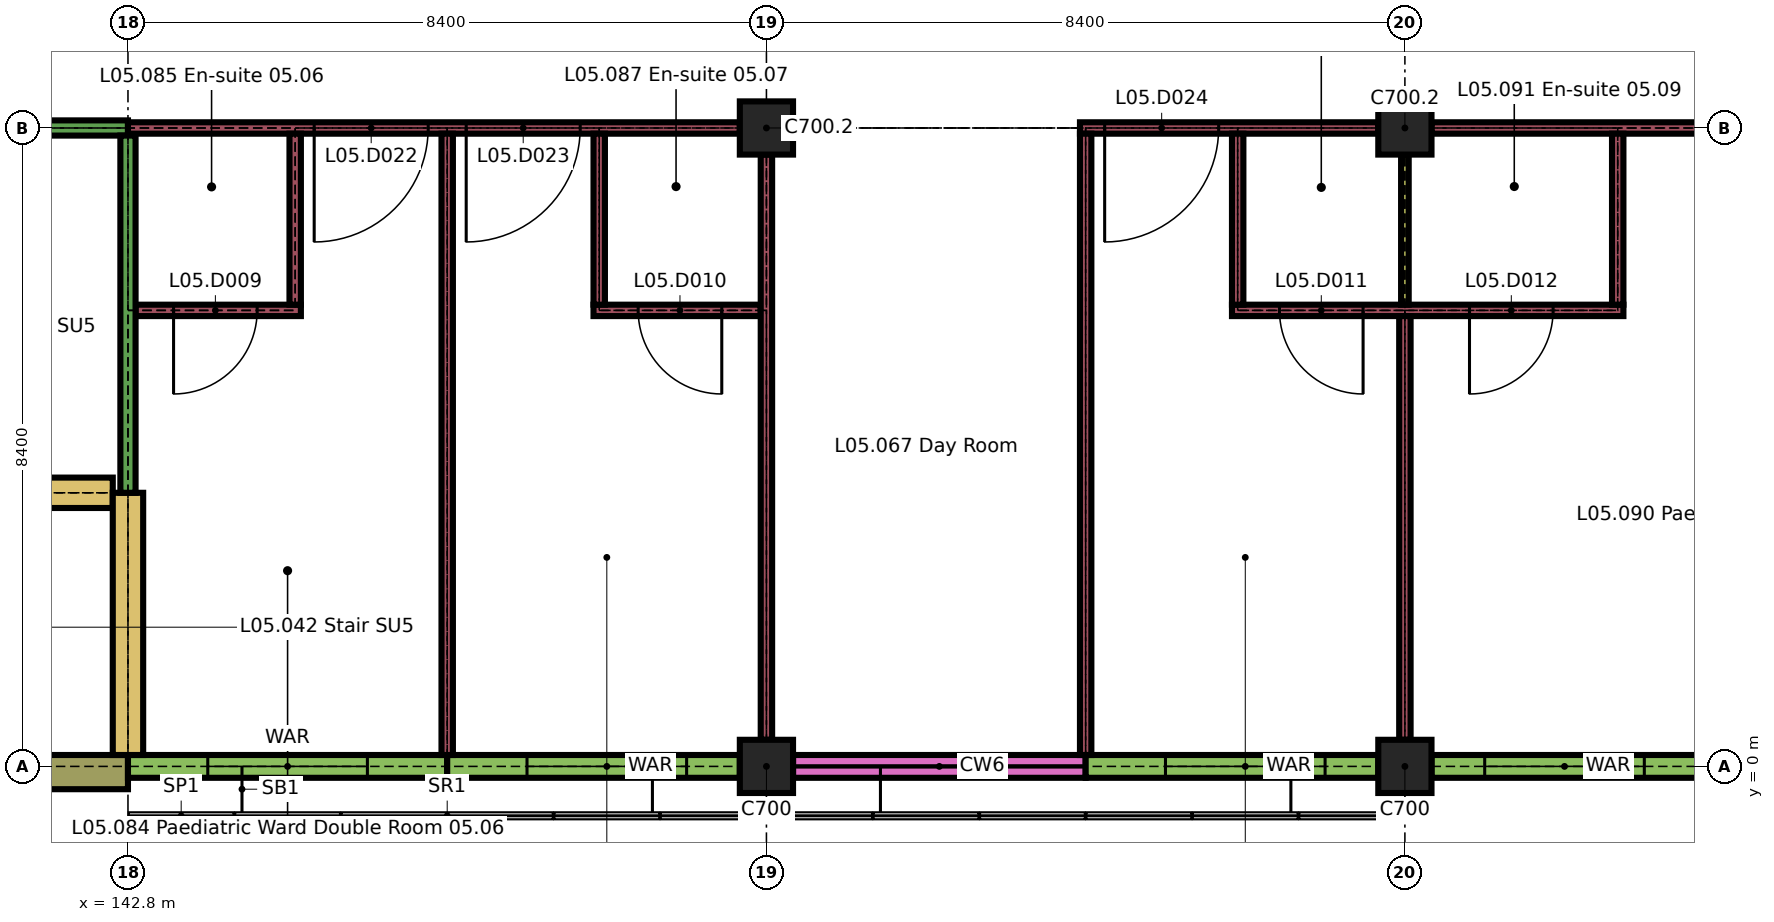
"""IFC4 building model, lengths in metres.
Left out: names, types, materials, properties, quantities, classifications, styles, units other than length and angle.
Written with IfcOpenShell. Run it as: python <this file> out.ifc"""

import sys

from ifc_helpers import new_model, si_unit, direction, frame, frame_2d, origin, origin_2d, place, context, subcontext, project, spatial, rectangle, extrude, element, fill, save


model = new_model("IFC4")
c1 = context("Model", 3, precision=1e-05, world=origin(), true_north=direction((0.0, 1.0)))
c2 = subcontext(c1, "Body", "Model", "MODEL_VIEW")
j1 = project(units=[si_unit("LENGTHUNIT", "METRE"), si_unit("PLANEANGLEUNIT", "RADIAN")], contexts=[c1])
p1 = place(None, origin())
s1 = spatial("IfcSite", under=j1, at=p1, CompositionType="ELEMENT")
p2 = place(p1, origin())
s2 = spatial("IfcBuilding", under=s1, at=p2, CompositionType="ELEMENT")
p3 = place(p2, frame((0.0, 0.0, 22.5)))
s3 = spatial("IfcBuildingStorey", under=s2, at=p3, CompositionType="ELEMENT", Elevation=22.5)
for number, where, z_axis, x_axis in (
    (1, (151.2, 0.0, 0.0), (0.0, 0.0, 1.0), (1.0, 0.0, 0.0)),
    (2, (159.6, 0.0, 0.0), (0.0, 0.0, 1.0), (1.0, 0.0, 0.0)),
    (3, (151.2, 8.4, 0.0), (0.0, 0.0, 1.0), (1.0, 0.0, 0.0)),
    (4, (159.6, 8.4, 0.0), (0.0, 0.0, 1.0), (1.0, 0.0, 0.0)),
):
    element("IfcColumn", number, at=place(p3, frame(where, z_axis=z_axis, x_axis=x_axis)), inside=s3, PredefinedType="COLUMN", context=c2, shape_type="SweptSolid", body=[
        extrude(rectangle(XDim=0.7, YDim=0.7, at=origin_2d()), origin(), (0.0, 0.0, 1.0), 3.26),
    ])
p4 = place(p3, frame((138.95, -0.075, 0.0), z_axis=(0.0, 0.0, 1.0), x_axis=(1.0, 0.0, 0.0)))
e5 = element("IfcWall", 5, at=p4, inside=s3, PredefinedType="SOLIDWALL", context=c2, shape_type="SweptSolid", body=[
    extrude(rectangle(XDim=3.85, YDim=0.45, at=frame_2d((1.925, 0.0))), origin(), (0.0, 0.0, 1.0), 3.26),
])
p5 = place(p3, frame((142.8, 0.0, 0.0), z_axis=(0.0, 0.0, 1.0), x_axis=(1.0, 0.0, 0.0)))
e6 = element("IfcWall", 6, at=p5, inside=s3, PredefinedType="SOLIDWALL", context=c2, shape_type="SweptSolid", body=[
    extrude(rectangle(XDim=4.2, YDim=0.3, at=frame_2d((2.1, 0.0))), origin(), (0.0, 0.0, 1.0), 2.96),
])
p6 = place(p5, frame((1.05, 0.0, 0.9)))
e7 = element("IfcOpeningElement", 7, at=p6, cuts=e6, PredefinedType="OPENING", context=c2, shape_type="SweptSolid", body=[
    extrude(rectangle(XDim=2.1, YDim=1.5, at=frame_2d((1.05, 0.75))), frame((0.0, 0.16, 0.0), z_axis=(0.0, -1.0, 0.0), x_axis=(1.0, 0.0, 0.0)), (0.0, 0.0, 1.0), 0.32),
])
p7 = place(p3, frame((147.0, 0.0, 0.0), z_axis=(0.0, 0.0, 1.0), x_axis=(1.0, 0.0, 0.0)))
e8 = element("IfcWall", 8, at=p7, inside=s3, PredefinedType="SOLIDWALL", context=c2, shape_type="SweptSolid", body=[
    extrude(rectangle(XDim=3.85, YDim=0.3, at=frame_2d((1.925, 0.0))), origin(), (0.0, 0.0, 1.0), 2.96),
])
p8 = place(p7, frame((1.05, 0.0, 0.9)))
e9 = element("IfcOpeningElement", 9, at=p8, cuts=e8, PredefinedType="OPENING", context=c2, shape_type="SweptSolid", body=[
    extrude(rectangle(XDim=2.1, YDim=1.5, at=frame_2d((1.05, 0.75))), frame((0.0, 0.16, 0.0), z_axis=(0.0, -1.0, 0.0), x_axis=(1.0, 0.0, 0.0)), (0.0, 0.0, 1.0), 0.32),
])
p9 = place(p3, frame((151.55, 0.0, 0.0), z_axis=(0.0, 0.0, 1.0), x_axis=(1.0, 0.0, 0.0)))
e10 = element("IfcWall", 10, at=p9, inside=s3, PredefinedType="SOLIDWALL", context=c2, shape_type="SweptSolid", body=[
    extrude(rectangle(XDim=3.85, YDim=0.3, at=frame_2d((1.925, 0.0))), origin(), (0.0, 0.0, 1.0), 0.6),
])
p10 = place(p3, frame((155.4, 0.0, 0.0), z_axis=(0.0, 0.0, 1.0), x_axis=(1.0, 0.0, 0.0)))
e11 = element("IfcWall", 11, at=p10, inside=s3, PredefinedType="SOLIDWALL", context=c2, shape_type="SweptSolid", body=[
    extrude(rectangle(XDim=3.85, YDim=0.3, at=frame_2d((1.925, 0.0))), origin(), (0.0, 0.0, 1.0), 2.96),
])
p11 = place(p10, frame((1.05, 0.0, 0.9)))
e12 = element("IfcOpeningElement", 12, at=p11, cuts=e11, PredefinedType="OPENING", context=c2, shape_type="SweptSolid", body=[
    extrude(rectangle(XDim=2.1, YDim=1.5, at=frame_2d((1.05, 0.75))), frame((0.0, 0.16, 0.0), z_axis=(0.0, -1.0, 0.0), x_axis=(1.0, 0.0, 0.0)), (0.0, 0.0, 1.0), 0.32),
])
p12 = place(p3, frame((159.95, 0.0, 0.0), z_axis=(0.0, 0.0, 1.0), x_axis=(1.0, 0.0, 0.0)))
e13 = element("IfcWall", 13, at=p12, inside=s3, PredefinedType="SOLIDWALL", context=c2, shape_type="SweptSolid", body=[
    extrude(rectangle(XDim=7.7, YDim=0.3, at=frame_2d((3.85, 0.0))), origin(), (0.0, 0.0, 1.0), 2.96),
])
p13 = place(p12, frame((0.7, 0.0, 0.9)))
e14 = element("IfcOpeningElement", 14, at=p13, cuts=e13, PredefinedType="OPENING", context=c2, shape_type="SweptSolid", body=[
    extrude(rectangle(XDim=2.1, YDim=1.5, at=frame_2d((1.05, 0.75))), frame((0.0, 0.16, 0.0), z_axis=(0.0, -1.0, 0.0), x_axis=(1.0, 0.0, 0.0)), (0.0, 0.0, 1.0), 0.32),
])
p14 = place(p12, frame((4.9, 0.0, 0.9)))
e15 = element("IfcOpeningElement", 15, at=p14, cuts=e13, PredefinedType="OPENING", context=c2, shape_type="SweptSolid", body=[
    extrude(rectangle(XDim=2.1, YDim=1.5, at=frame_2d((1.05, 0.75))), frame((0.0, 0.16, 0.0), z_axis=(0.0, -1.0, 0.0), x_axis=(1.0, 0.0, 0.0)), (0.0, 0.0, 1.0), 0.32),
])
p15 = place(p3, frame((134.6, 3.6, 0.0), z_axis=(0.0, 0.0, 1.0), x_axis=(1.0, 0.0, 0.0)))
e16 = element("IfcWall", 16, at=p15, inside=s3, PredefinedType="SHEAR", context=c2, shape_type="SweptSolid", body=[
    extrude(rectangle(XDim=8.0, YDim=0.4, at=frame_2d((4.0, 0.0))), origin(), (0.0, 0.0, 1.0), 3.26),
])
p16 = place(p15, frame((0.4, 0.0, 0.0)))
e17 = element("IfcOpeningElement", 17, at=p16, cuts=e16, PredefinedType="OPENING", context=c2, shape_type="SweptSolid", body=[
    extrude(rectangle(XDim=1.2, YDim=2.1, at=frame_2d((0.6, 1.05))), frame((0.0, 0.21, 0.0), z_axis=(0.0, -1.0, 0.0), x_axis=(1.0, 0.0, 0.0)), (0.0, 0.0, 1.0), 0.42),
])
p17 = place(p3, frame((142.9, 6.0, 0.0), z_axis=(0.0, 0.0, 1.0), x_axis=(1.0, 0.0, 0.0)))
e18 = element("IfcWall", 18, at=p17, inside=s3, PredefinedType="PARTITIONING", context=c2, shape_type="SweptSolid", body=[
    extrude(rectangle(XDim=2.175, YDim=0.15, at=frame_2d((1.087, 0.0))), origin(), (0.0, 0.0, 1.0), 3.26),
])
p18 = place(p17, frame((0.5, 0.0, 0.0)))
e19 = element("IfcOpeningElement", 19, at=p18, cuts=e18, PredefinedType="OPENING", context=c2, shape_type="SweptSolid", body=[
    extrude(rectangle(XDim=1.1, YDim=2.1, at=frame_2d((0.55, 1.05))), frame((0.0, 0.085, 0.0), z_axis=(0.0, -1.0, 0.0), x_axis=(1.0, 0.0, 0.0)), (0.0, 0.0, 1.0), 0.17),
])
p19 = place(p3, frame((148.925, 6.0, 0.0), z_axis=(0.0, 0.0, 1.0), x_axis=(1.0, 0.0, 0.0)))
e20 = element("IfcWall", 20, at=p19, inside=s3, PredefinedType="PARTITIONING", context=c2, shape_type="SweptSolid", body=[
    extrude(rectangle(XDim=2.2, YDim=0.15, at=frame_2d((1.1, 0.0))), origin(), (0.0, 0.0, 1.0), 3.26),
])
p20 = place(p19, frame((0.587, 0.0, 0.0)))
e21 = element("IfcOpeningElement", 21, at=p20, cuts=e20, PredefinedType="OPENING", context=c2, shape_type="SweptSolid", body=[
    extrude(rectangle(XDim=1.1, YDim=2.1, at=frame_2d((0.55, 1.05))), frame((0.0, 0.085, 0.0), z_axis=(0.0, -1.0, 0.0), x_axis=(1.0, 0.0, 0.0)), (0.0, 0.0, 1.0), 0.17),
])
p21 = place(p3, frame((157.325, 6.0, 0.0), z_axis=(0.0, 0.0, 1.0), x_axis=(1.0, 0.0, 0.0)))
e22 = element("IfcWall", 22, at=p21, inside=s3, PredefinedType="PARTITIONING", context=c2, shape_type="SweptSolid", body=[
    extrude(rectangle(XDim=5.15, YDim=0.15, at=frame_2d((2.575, 0.0))), origin(), (0.0, 0.0, 1.0), 3.26),
])
p22 = place(p21, frame((0.625, 0.0, 0.0)))
e23 = element("IfcOpeningElement", 23, at=p22, cuts=e22, PredefinedType="OPENING", context=c2, shape_type="SweptSolid", body=[
    extrude(rectangle(XDim=1.1, YDim=2.1, at=frame_2d((0.55, 1.05))), frame((0.0, 0.085, 0.0), z_axis=(0.0, -1.0, 0.0), x_axis=(1.0, 0.0, 0.0)), (0.0, 0.0, 1.0), 0.17),
])
p23 = place(p21, frame((3.125, 0.0, 0.0)))
e24 = element("IfcOpeningElement", 24, at=p23, cuts=e22, PredefinedType="OPENING", context=c2, shape_type="SweptSolid", body=[
    extrude(rectangle(XDim=1.1, YDim=2.1, at=frame_2d((0.55, 1.05))), frame((0.0, 0.085, 0.0), z_axis=(0.0, -1.0, 0.0), x_axis=(1.0, 0.0, 0.0)), (0.0, 0.0, 1.0), 0.17),
])
p24 = place(p3, frame((134.3, 8.4, 0.0), z_axis=(0.0, 0.0, 1.0), x_axis=(1.0, 0.0, 0.0)))
e25 = element("IfcWall", 25, at=p24, inside=s3, PredefinedType="PARTITIONING", context=c2, shape_type="SweptSolid", body=[
    extrude(rectangle(XDim=8.5, YDim=0.2, at=frame_2d((4.25, 0.0))), origin(), (0.0, 0.0, 1.0), 3.26),
])
p25 = place(p24, frame((3.3, 0.0, 0.0)))
e26 = element("IfcOpeningElement", 26, at=p25, cuts=e25, PredefinedType="OPENING", context=c2, shape_type="SweptSolid", body=[
    extrude(rectangle(XDim=2.0, YDim=2.4, at=frame_2d((1.0, 1.2))), frame((0.0, 0.11, 0.0), z_axis=(0.0, -1.0, 0.0), x_axis=(1.0, 0.0, 0.0)), (0.0, 0.0, 1.0), 0.22),
])
p26 = place(p3, frame((142.8, 8.4, 0.0), z_axis=(0.0, 0.0, 1.0), x_axis=(1.0, 0.0, 0.0)))
e27 = element("IfcWall", 27, at=p26, inside=s3, PredefinedType="PARTITIONING", context=c2, shape_type="SweptSolid", body=[
    extrude(rectangle(XDim=8.05, YDim=0.15, at=frame_2d((4.025, 0.0))), origin(), (0.0, 0.0, 1.0), 3.26),
])
p27 = place(p26, frame((2.45, 0.0, 0.0)))
e28 = element("IfcOpeningElement", 28, at=p27, cuts=e27, PredefinedType="OPENING", context=c2, shape_type="SweptSolid", body=[
    extrude(rectangle(XDim=1.5, YDim=2.4, at=frame_2d((0.75, 1.2))), frame((0.0, 0.085, 0.0), z_axis=(0.0, -1.0, 0.0), x_axis=(1.0, 0.0, 0.0)), (0.0, 0.0, 1.0), 0.17),
])
p28 = place(p26, frame((4.45, 0.0, 0.0)))
e29 = element("IfcOpeningElement", 29, at=p28, cuts=e27, PredefinedType="OPENING", context=c2, shape_type="SweptSolid", body=[
    extrude(rectangle(XDim=1.5, YDim=2.4, at=frame_2d((0.75, 1.2))), frame((0.0, 0.085, 0.0), z_axis=(0.0, -1.0, 0.0), x_axis=(1.0, 0.0, 0.0)), (0.0, 0.0, 1.0), 0.17),
])
p29 = place(p3, frame((155.325, 8.4, 0.0), z_axis=(0.0, 0.0, 1.0), x_axis=(1.0, 0.0, 0.0)))
e30 = element("IfcWall", 30, at=p29, inside=s3, PredefinedType="PARTITIONING", context=c2, shape_type="SweptSolid", body=[
    extrude(rectangle(XDim=3.925, YDim=0.15, at=frame_2d((1.962, 0.0))), origin(), (0.0, 0.0, 1.0), 3.26),
])
p30 = place(p29, frame((0.325, 0.0, 0.0)))
e31 = element("IfcOpeningElement", 31, at=p30, cuts=e30, PredefinedType="OPENING", context=c2, shape_type="SweptSolid", body=[
    extrude(rectangle(XDim=1.5, YDim=2.4, at=frame_2d((0.75, 1.2))), frame((0.0, 0.085, 0.0), z_axis=(0.0, -1.0, 0.0), x_axis=(1.0, 0.0, 0.0)), (0.0, 0.0, 1.0), 0.17),
])
p31 = place(p3, frame((159.95, 8.4, 0.0), z_axis=(0.0, 0.0, 1.0), x_axis=(1.0, 0.0, 0.0)))
e32 = element("IfcWall", 32, at=p31, inside=s3, PredefinedType="PARTITIONING", context=c2, shape_type="SweptSolid", body=[
    extrude(rectangle(XDim=7.7, YDim=0.15, at=frame_2d((3.85, 0.0))), origin(), (0.0, 0.0, 1.0), 3.26),
])
p32 = place(p31, frame((4.325, 0.0, 0.0)))
e33 = element("IfcOpeningElement", 33, at=p32, cuts=e32, PredefinedType="OPENING", context=c2, shape_type="SweptSolid", body=[
    extrude(rectangle(XDim=1.5, YDim=2.4, at=frame_2d((0.75, 1.2))), frame((0.0, 0.085, 0.0), z_axis=(0.0, -1.0, 0.0), x_axis=(1.0, 0.0, 0.0)), (0.0, 0.0, 1.0), 0.17),
])
p33 = place(p3, frame((142.8, 0.15, 0.0), z_axis=(0.0, 0.0, 1.0), x_axis=(0.0, 1.0, 0.0)))
e34 = element("IfcWall", 34, at=p33, inside=s3, PredefinedType="SHEAR", context=c2, shape_type="SweptSolid", body=[
    extrude(rectangle(XDim=3.45, YDim=0.4, at=frame_2d((1.725, 0.0))), origin(), (0.0, 0.0, 1.0), 3.26),
])
p34 = place(p3, frame((142.8, 3.6, 0.0), z_axis=(0.0, 0.0, 1.0), x_axis=(0.0, 1.0, 0.0)))
e35 = element("IfcWall", 35, at=p34, inside=s3, PredefinedType="PARTITIONING", context=c2, shape_type="SweptSolid", body=[
    extrude(rectangle(XDim=4.7, YDim=0.2, at=frame_2d((2.35, 0.0))), origin(), (0.0, 0.0, 1.0), 3.26),
])
p35 = place(p3, frame((145.0, 6.075, 0.0), z_axis=(0.0, 0.0, 1.0), x_axis=(0.0, 1.0, 0.0)))
e36 = element("IfcWall", 36, at=p35, inside=s3, PredefinedType="PARTITIONING", context=c2, shape_type="SweptSolid", body=[
    extrude(rectangle(XDim=2.25, YDim=0.15, at=frame_2d((1.125, 0.0))), origin(), (0.0, 0.0, 1.0), 3.26),
])
p36 = place(p3, frame((147.0, 0.15, 0.0), z_axis=(0.0, 0.0, 1.0), x_axis=(0.0, 1.0, 0.0)))
e37 = element("IfcWall", 37, at=p36, inside=s3, PredefinedType="PARTITIONING", context=c2, shape_type="SweptSolid", body=[
    extrude(rectangle(XDim=8.175, YDim=0.15, at=frame_2d((4.087, 0.0))), origin(), (0.0, 0.0, 1.0), 3.26),
])
p37 = place(p3, frame((149.0, 6.075, 0.0), z_axis=(0.0, 0.0, 1.0), x_axis=(0.0, 1.0, 0.0)))
e38 = element("IfcWall", 38, at=p37, inside=s3, PredefinedType="PARTITIONING", context=c2, shape_type="SweptSolid", body=[
    extrude(rectangle(XDim=2.25, YDim=0.15, at=frame_2d((1.125, 0.0))), origin(), (0.0, 0.0, 1.0), 3.26),
])
p38 = place(p3, frame((151.2, 0.35, 0.0), z_axis=(0.0, 0.0, 1.0), x_axis=(0.0, 1.0, 0.0)))
e39 = element("IfcWall", 39, at=p38, inside=s3, PredefinedType="PARTITIONING", context=c2, shape_type="SweptSolid", body=[
    extrude(rectangle(XDim=7.7, YDim=0.15, at=frame_2d((3.85, 0.0))), origin(), (0.0, 0.0, 1.0), 3.26),
])
p39 = place(p3, frame((155.4, 0.15, 0.0), z_axis=(0.0, 0.0, 1.0), x_axis=(0.0, 1.0, 0.0)))
e40 = element("IfcWall", 40, at=p39, inside=s3, PredefinedType="PARTITIONING", context=c2, shape_type="SweptSolid", body=[
    extrude(rectangle(XDim=8.175, YDim=0.15, at=frame_2d((4.087, 0.0))), origin(), (0.0, 0.0, 1.0), 3.26),
])
p40 = place(p3, frame((157.4, 6.075, 0.0), z_axis=(0.0, 0.0, 1.0), x_axis=(0.0, 1.0, 0.0)))
e41 = element("IfcWall", 41, at=p40, inside=s3, PredefinedType="PARTITIONING", context=c2, shape_type="SweptSolid", body=[
    extrude(rectangle(XDim=2.25, YDim=0.15, at=frame_2d((1.125, 0.0))), origin(), (0.0, 0.0, 1.0), 3.26),
])
p41 = place(p3, frame((159.6, 0.35, 0.0), z_axis=(0.0, 0.0, 1.0), x_axis=(0.0, 1.0, 0.0)))
e42 = element("IfcWall", 42, at=p41, inside=s3, PredefinedType="PARTITIONING", context=c2, shape_type="SweptSolid", body=[
    extrude(rectangle(XDim=5.575, YDim=0.15, at=frame_2d((2.788, 0.0))), origin(), (0.0, 0.0, 1.0), 3.26),
])
p42 = place(p3, frame((159.6, 6.075, 0.0), z_axis=(0.0, 0.0, 1.0), x_axis=(0.0, 1.0, 0.0)))
e43 = element("IfcWall", 43, at=p42, inside=s3, PredefinedType="PARTITIONING", context=c2, shape_type="SweptSolid", body=[
    extrude(rectangle(XDim=1.975, YDim=0.1, at=frame_2d((0.988, 0.0))), origin(), (0.0, 0.0, 1.0), 3.26),
])
p43 = place(p3, frame((162.4, 6.075, 0.0), z_axis=(0.0, 0.0, 1.0), x_axis=(0.0, 1.0, 0.0)))
e44 = element("IfcWall", 44, at=p43, inside=s3, PredefinedType="PARTITIONING", context=c2, shape_type="SweptSolid", body=[
    extrude(rectangle(XDim=2.25, YDim=0.15, at=frame_2d((1.125, 0.0))), origin(), (0.0, 0.0, 1.0), 3.26),
])
p44 = place(p6, origin())
e45 = element("IfcWindow", 45, at=p44, inside=s3, PartitioningType="DOUBLE_PANEL_VERTICAL", PredefinedType="WINDOW", context=c2, shape_type="SweptSolid", body=[
    extrude(rectangle(XDim=2.1, YDim=1.5, at=frame_2d((1.05, 0.75))), frame((0.0, 0.05, 0.0), z_axis=(0.0, -1.0, 0.0), x_axis=(1.0, 0.0, 0.0)), (0.0, 0.0, 1.0), 0.1),
])
fill(e7, e45)
p45 = place(p8, origin())
e46 = element("IfcWindow", 46, at=p45, inside=s3, PartitioningType="DOUBLE_PANEL_VERTICAL", PredefinedType="WINDOW", context=c2, shape_type="SweptSolid", body=[
    extrude(rectangle(XDim=2.1, YDim=1.5, at=frame_2d((1.05, 0.75))), frame((0.0, 0.05, 0.0), z_axis=(0.0, -1.0, 0.0), x_axis=(1.0, 0.0, 0.0)), (0.0, 0.0, 1.0), 0.1),
])
fill(e9, e46)
p46 = place(p11, origin())
e47 = element("IfcWindow", 47, at=p46, inside=s3, PartitioningType="DOUBLE_PANEL_VERTICAL", PredefinedType="WINDOW", context=c2, shape_type="SweptSolid", body=[
    extrude(rectangle(XDim=2.1, YDim=1.5, at=frame_2d((1.05, 0.75))), frame((0.0, 0.05, 0.0), z_axis=(0.0, -1.0, 0.0), x_axis=(1.0, 0.0, 0.0)), (0.0, 0.0, 1.0), 0.1),
])
fill(e12, e47)
p47 = place(p13, origin())
e48 = element("IfcWindow", 48, at=p47, inside=s3, PartitioningType="DOUBLE_PANEL_VERTICAL", PredefinedType="WINDOW", context=c2, shape_type="SweptSolid", body=[
    extrude(rectangle(XDim=2.1, YDim=1.5, at=frame_2d((1.05, 0.75))), frame((0.0, 0.05, 0.0), z_axis=(0.0, -1.0, 0.0), x_axis=(1.0, 0.0, 0.0)), (0.0, 0.0, 1.0), 0.1),
])
fill(e14, e48)
p48 = place(p18, origin())
e49 = element("IfcDoor", 49, at=p48, inside=s3, OperationType="SINGLE_SWING_LEFT", PredefinedType="DOOR", context=c2, shape_type="SweptSolid", body=[
    extrude(rectangle(XDim=1.1, YDim=2.1, at=frame_2d((0.55, 1.05))), frame((0.0, 0.025, 0.0), z_axis=(0.0, -1.0, 0.0), x_axis=(1.0, 0.0, 0.0)), (0.0, 0.0, 1.0), 0.05),
])
fill(e19, e49)
p49 = place(p20, origin())
e50 = element("IfcDoor", 50, at=p49, inside=s3, OperationType="SINGLE_SWING_RIGHT", PredefinedType="DOOR", context=c2, shape_type="SweptSolid", body=[
    extrude(rectangle(XDim=1.1, YDim=2.1, at=frame_2d((0.55, 1.05))), frame((0.0, 0.025, 0.0), z_axis=(0.0, -1.0, 0.0), x_axis=(1.0, 0.0, 0.0)), (0.0, 0.0, 1.0), 0.05),
])
fill(e21, e50)
p50 = place(p22, origin())
e51 = element("IfcDoor", 51, at=p50, inside=s3, OperationType="SINGLE_SWING_RIGHT", PredefinedType="DOOR", context=c2, shape_type="SweptSolid", body=[
    extrude(rectangle(XDim=1.1, YDim=2.1, at=frame_2d((0.55, 1.05))), frame((0.0, 0.025, 0.0), z_axis=(0.0, -1.0, 0.0), x_axis=(1.0, 0.0, 0.0)), (0.0, 0.0, 1.0), 0.05),
])
fill(e23, e51)
p51 = place(p23, origin())
e52 = element("IfcDoor", 52, at=p51, inside=s3, OperationType="SINGLE_SWING_LEFT", PredefinedType="DOOR", context=c2, shape_type="SweptSolid", body=[
    extrude(rectangle(XDim=1.1, YDim=2.1, at=frame_2d((0.55, 1.05))), frame((0.0, 0.025, 0.0), z_axis=(0.0, -1.0, 0.0), x_axis=(1.0, 0.0, 0.0)), (0.0, 0.0, 1.0), 0.05),
])
fill(e24, e52)
p52 = place(p27, origin())
e53 = element("IfcDoor", 53, at=p52, inside=s3, OperationType="SINGLE_SWING_LEFT", PredefinedType="DOOR", context=c2, shape_type="SweptSolid", body=[
    extrude(rectangle(XDim=1.5, YDim=2.4, at=frame_2d((0.75, 1.2))), frame((0.0, 0.03, 0.0), z_axis=(0.0, -1.0, 0.0), x_axis=(1.0, 0.0, 0.0)), (0.0, 0.0, 1.0), 0.06),
])
fill(e28, e53)
p53 = place(p28, origin())
e54 = element("IfcDoor", 54, at=p53, inside=s3, OperationType="SINGLE_SWING_LEFT", PredefinedType="DOOR", context=c2, shape_type="SweptSolid", body=[
    extrude(rectangle(XDim=1.5, YDim=2.4, at=frame_2d((0.75, 1.2))), frame((0.0, 0.03, 0.0), z_axis=(0.0, -1.0, 0.0), x_axis=(1.0, 0.0, 0.0)), (0.0, 0.0, 1.0), 0.06),
])
fill(e29, e54)
p54 = place(p30, origin())
e55 = element("IfcDoor", 55, at=p54, inside=s3, OperationType="SINGLE_SWING_LEFT", PredefinedType="DOOR", context=c2, shape_type="SweptSolid", body=[
    extrude(rectangle(XDim=1.5, YDim=2.4, at=frame_2d((0.75, 1.2))), frame((0.0, 0.03, 0.0), z_axis=(0.0, -1.0, 0.0), x_axis=(1.0, 0.0, 0.0)), (0.0, 0.0, 1.0), 0.06),
])
fill(e31, e55)
save(model, sys.argv[1])
